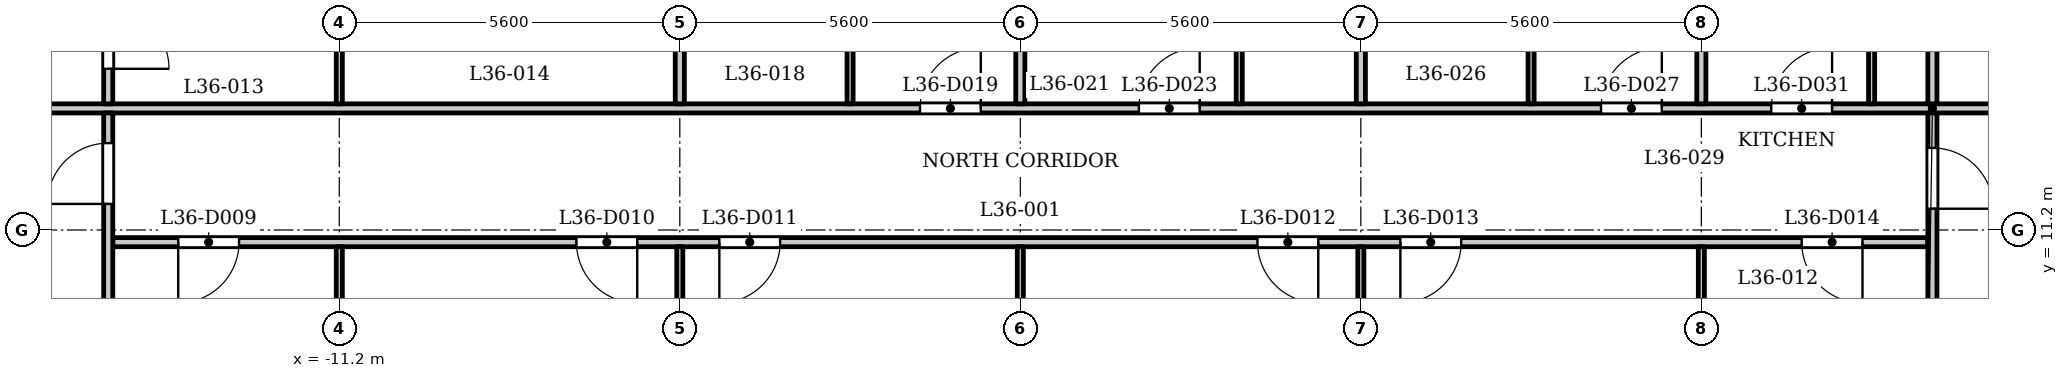
"""IFC4 building model, lengths in metres.
Left out: names, types, materials, properties, quantities, classifications, styles, units other than length and angle.
Written with IfcOpenShell. Run it as: python <this file> out.ifc"""

import sys

from ifc_helpers import new_model, si_unit, direction, frame, frame_2d, origin, place, context, subcontext, project, spatial, rectangle, extrude, element, fill, save


model = new_model("IFC4")
c1 = context("Model", 3, precision=1e-05, world=origin(), true_north=direction((0.0, 1.0)))
c2 = subcontext(c1, "Body", "Model", "MODEL_VIEW")
j1 = project(units=[si_unit("LENGTHUNIT", "METRE"), si_unit("PLANEANGLEUNIT", "RADIAN")], contexts=[c1])
p1 = place(None, origin())
s1 = spatial("IfcSite", under=j1, at=p1, CompositionType="ELEMENT")
p2 = place(p1, origin())
s2 = spatial("IfcBuilding", under=s1, at=p2, CompositionType="ELEMENT")
p3 = place(p2, frame((0.0, 0.0, 143.1)))
s3 = spatial("IfcBuildingStorey", under=s2, at=p3, CompositionType="ELEMENT", Elevation=143.1)
p4 = place(p3, frame((-14.925, 11.0, 0.0), z_axis=(0.0, 0.0, 1.0), x_axis=(1.0, 0.0, 0.0)))
e1 = element("IfcWall", 1, at=p4, inside=s3, PredefinedType="PARTITIONING", context=c2, shape_type="SweptSolid", body=[
    extrude(rectangle(XDim=29.85, YDim=0.15, at=frame_2d((14.925, 0.0))), origin(), (0.0, 0.0, 1.0), 3.2),
])
p5 = place(p4, frame((1.076, 0.0, 0.0)))
e2 = element("IfcOpeningElement", 2, at=p5, cuts=e1, PredefinedType="OPENING", context=c2, shape_type="SweptSolid", body=[
    extrude(rectangle(XDim=1.0, YDim=2.1, at=frame_2d((0.5, 1.05))), frame((0.0, 0.085, 0.0), z_axis=(0.0, -1.0, 0.0), x_axis=(1.0, 0.0, 0.0)), (0.0, 0.0, 1.0), 0.17),
])
p6 = place(p4, frame((7.625, 0.0, 0.0)))
e3 = element("IfcOpeningElement", 3, at=p6, cuts=e1, PredefinedType="OPENING", context=c2, shape_type="SweptSolid", body=[
    extrude(rectangle(XDim=1.0, YDim=2.1, at=frame_2d((0.5, 1.05))), frame((0.0, 0.085, 0.0), z_axis=(0.0, -1.0, 0.0), x_axis=(1.0, 0.0, 0.0)), (0.0, 0.0, 1.0), 0.17),
])
p7 = place(p4, frame((9.975, 0.0, 0.0)))
e4 = element("IfcOpeningElement", 4, at=p7, cuts=e1, PredefinedType="OPENING", context=c2, shape_type="SweptSolid", body=[
    extrude(rectangle(XDim=1.0, YDim=2.1, at=frame_2d((0.5, 1.05))), frame((0.0, 0.085, 0.0), z_axis=(0.0, -1.0, 0.0), x_axis=(1.0, 0.0, 0.0)), (0.0, 0.0, 1.0), 0.17),
])
p8 = place(p4, frame((18.825, 0.0, 0.0)))
e5 = element("IfcOpeningElement", 5, at=p8, cuts=e1, PredefinedType="OPENING", context=c2, shape_type="SweptSolid", body=[
    extrude(rectangle(XDim=1.0, YDim=2.1, at=frame_2d((0.5, 1.05))), frame((0.0, 0.085, 0.0), z_axis=(0.0, -1.0, 0.0), x_axis=(1.0, 0.0, 0.0)), (0.0, 0.0, 1.0), 0.17),
])
p9 = place(p4, frame((21.175, 0.0, 0.0)))
e6 = element("IfcOpeningElement", 6, at=p9, cuts=e1, PredefinedType="OPENING", context=c2, shape_type="SweptSolid", body=[
    extrude(rectangle(XDim=1.0, YDim=2.1, at=frame_2d((0.5, 1.05))), frame((0.0, 0.085, 0.0), z_axis=(0.0, -1.0, 0.0), x_axis=(1.0, 0.0, 0.0)), (0.0, 0.0, 1.0), 0.17),
])
p10 = place(p4, frame((27.775, 0.0, 0.0)))
e7 = element("IfcOpeningElement", 7, at=p10, cuts=e1, PredefinedType="OPENING", context=c2, shape_type="SweptSolid", body=[
    extrude(rectangle(XDim=1.0, YDim=2.1, at=frame_2d((0.5, 1.05))), frame((0.0, 0.085, 0.0), z_axis=(0.0, -1.0, 0.0), x_axis=(1.0, 0.0, 0.0)), (0.0, 0.0, 1.0), 0.17),
])
p11 = place(p3, frame((-17.4, 13.2, 0.0), z_axis=(0.0, 0.0, 1.0), x_axis=(1.0, 0.0, 0.0)))
e8 = element("IfcWall", 8, at=p11, inside=s3, PredefinedType="PARTITIONING", context=c2, shape_type="SweptSolid", body=[
    extrude(rectangle(XDim=34.8, YDim=0.15, at=frame_2d((17.4, 0.0))), origin(), (0.0, 0.0, 1.0), 3.2),
])
p12 = place(p11, frame((0.25, 0.0, 0.0)))
e9 = element("IfcOpeningElement", 9, at=p12, cuts=e8, PredefinedType="OPENING", context=c2, shape_type="SweptSolid", body=[
    extrude(rectangle(XDim=1.0, YDim=2.1, at=frame_2d((0.5, 1.05))), frame((0.0, 0.085, 0.0), z_axis=(0.0, -1.0, 0.0), x_axis=(1.0, 0.0, 0.0)), (0.0, 0.0, 1.0), 0.17),
])
p13 = place(p11, frame((33.65, 0.0, 0.0)))
e10 = element("IfcOpeningElement", 10, at=p13, cuts=e8, PredefinedType="OPENING", context=c2, shape_type="SweptSolid", body=[
    extrude(rectangle(XDim=1.0, YDim=2.1, at=frame_2d((0.5, 1.05))), frame((0.0, 0.085, 0.0), z_axis=(0.0, -1.0, 0.0), x_axis=(1.0, 0.0, 0.0)), (0.0, 0.0, 1.0), 0.17),
])
p14 = place(p11, frame((15.75, 0.0, 0.0)))
e11 = element("IfcOpeningElement", 11, at=p14, cuts=e8, PredefinedType="OPENING", context=c2, shape_type="SweptSolid", body=[
    extrude(rectangle(XDim=1.0, YDim=2.1, at=frame_2d((0.5, 1.05))), frame((0.0, 0.085, 0.0), z_axis=(0.0, -1.0, 0.0), x_axis=(1.0, 0.0, 0.0)), (0.0, 0.0, 1.0), 0.17),
])
p15 = place(p11, frame((19.35, 0.0, 0.0)))
e12 = element("IfcOpeningElement", 12, at=p15, cuts=e8, PredefinedType="OPENING", context=c2, shape_type="SweptSolid", body=[
    extrude(rectangle(XDim=1.0, YDim=2.1, at=frame_2d((0.5, 1.05))), frame((0.0, 0.085, 0.0), z_axis=(0.0, -1.0, 0.0), x_axis=(1.0, 0.0, 0.0)), (0.0, 0.0, 1.0), 0.17),
])
p16 = place(p11, frame((26.95, 0.0, 0.0)))
e13 = element("IfcOpeningElement", 13, at=p16, cuts=e8, PredefinedType="OPENING", context=c2, shape_type="SweptSolid", body=[
    extrude(rectangle(XDim=1.0, YDim=2.1, at=frame_2d((0.5, 1.05))), frame((0.0, 0.085, 0.0), z_axis=(0.0, -1.0, 0.0), x_axis=(1.0, 0.0, 0.0)), (0.0, 0.0, 1.0), 0.17),
])
p17 = place(p11, frame((29.75, 0.0, 0.0)))
e14 = element("IfcOpeningElement", 14, at=p17, cuts=e8, PredefinedType="OPENING", context=c2, shape_type="SweptSolid", body=[
    extrude(rectangle(XDim=1.0, YDim=2.1, at=frame_2d((0.5, 1.05))), frame((0.0, 0.085, 0.0), z_axis=(0.0, -1.0, 0.0), x_axis=(1.0, 0.0, 0.0)), (0.0, 0.0, 1.0), 0.17),
])
p18 = place(p3, frame((-15.0, 6.769, 0.0), z_axis=(0.0, 0.0, 1.0), x_axis=(0.0, 1.0, 0.0)))
e15 = element("IfcWall", 15, at=p18, inside=s3, PredefinedType="PARTITIONING", context=c2, shape_type="SweptSolid", body=[
    extrude(rectangle(XDim=6.356, YDim=0.15, at=frame_2d((3.178, 0.0))), origin(), (0.0, 0.0, 1.0), 3.2),
])
p19 = place(p18, frame((4.86, 0.0, 0.0)))
e16 = element("IfcOpeningElement", 16, at=p19, cuts=e15, PredefinedType="OPENING", context=c2, shape_type="SweptSolid", body=[
    extrude(rectangle(XDim=1.0, YDim=2.1, at=frame_2d((0.5, 1.05))), frame((0.0, 0.085, 0.0), z_axis=(0.0, -1.0, 0.0), x_axis=(1.0, 0.0, 0.0)), (0.0, 0.0, 1.0), 0.17),
])
p20 = place(p3, frame((-15.0, 13.275, 0.0), z_axis=(0.0, 0.0, 1.0), x_axis=(0.0, 1.0, 0.0)))
e17 = element("IfcWall", 17, at=p20, inside=s3, PredefinedType="PARTITIONING", context=c2, shape_type="SweptSolid", body=[
    extrude(rectangle(XDim=2.05, YDim=0.15, at=frame_2d((1.025, 0.0))), origin(), (0.0, 0.0, 1.0), 3.2),
])
p21 = place(p20, frame((0.576, 0.0, 0.0)))
e18 = element("IfcOpeningElement", 18, at=p21, cuts=e17, PredefinedType="OPENING", context=c2, shape_type="SweptSolid", body=[
    extrude(rectangle(XDim=1.0, YDim=2.1, at=frame_2d((0.5, 1.05))), frame((0.0, 0.085, 0.0), z_axis=(0.0, -1.0, 0.0), x_axis=(1.0, 0.0, 0.0)), (0.0, 0.0, 1.0), 0.17),
])
p22 = place(p3, frame((-11.2, 7.32, 0.0), z_axis=(0.0, 0.0, 1.0), x_axis=(0.0, 1.0, 0.0)))
e19 = element("IfcWall", 19, at=p22, inside=s3, PredefinedType="PARTITIONING", context=c2, shape_type="SweptSolid", body=[
    extrude(rectangle(XDim=3.605, YDim=0.1, at=frame_2d((1.802, 0.0))), origin(), (0.0, 0.0, 1.0), 3.2),
])
p23 = place(p3, frame((-11.2, 13.275, 0.0), z_axis=(0.0, 0.0, 1.0), x_axis=(0.0, 1.0, 0.0)))
e20 = element("IfcWall", 20, at=p23, inside=s3, PredefinedType="PARTITIONING", context=c2, shape_type="SweptSolid", body=[
    extrude(rectangle(XDim=3.175, YDim=0.1, at=frame_2d((1.587, 0.0))), origin(), (0.0, 0.0, 1.0), 3.2),
])
p24 = place(p3, frame((-5.6, 7.32, 0.0), z_axis=(0.0, 0.0, 1.0), x_axis=(0.0, 1.0, 0.0)))
e21 = element("IfcWall", 21, at=p24, inside=s3, PredefinedType="PARTITIONING", context=c2, shape_type="SweptSolid", body=[
    extrude(rectangle(XDim=3.605, YDim=0.1, at=frame_2d((1.802, 0.0))), origin(), (0.0, 0.0, 1.0), 3.2),
])
p25 = place(p3, frame((-5.6, 13.275, 0.0), z_axis=(0.0, 0.0, 1.0), x_axis=(0.0, 1.0, 0.0)))
e22 = element("IfcWall", 22, at=p25, inside=s3, PredefinedType="PARTITIONING", context=c2, shape_type="SweptSolid", body=[
    extrude(rectangle(XDim=3.175, YDim=0.15, at=frame_2d((1.587, 0.0))), origin(), (0.0, 0.0, 1.0), 3.2),
])
p26 = place(p3, frame((-2.8, 13.275, 0.0), z_axis=(0.0, 0.0, 1.0), x_axis=(0.0, 1.0, 0.0)))
e23 = element("IfcWall", 23, at=p26, inside=s3, PredefinedType="PARTITIONING", context=c2, shape_type="SweptSolid", body=[
    extrude(rectangle(XDim=3.175, YDim=0.1, at=frame_2d((1.587, 0.0))), origin(), (0.0, 0.0, 1.0), 3.2),
])
p27 = place(p3, frame((0.0, 7.32, 0.0), z_axis=(0.0, 0.0, 1.0), x_axis=(0.0, 1.0, 0.0)))
e24 = element("IfcWall", 24, at=p27, inside=s3, PredefinedType="PARTITIONING", context=c2, shape_type="SweptSolid", body=[
    extrude(rectangle(XDim=3.605, YDim=0.1, at=frame_2d((1.802, 0.0))), origin(), (0.0, 0.0, 1.0), 3.2),
])
p28 = place(p3, frame((0.0, 13.275, 0.0), z_axis=(0.0, 0.0, 1.0), x_axis=(0.0, 1.0, 0.0)))
e25 = element("IfcWall", 25, at=p28, inside=s3, PredefinedType="PARTITIONING", context=c2, shape_type="SweptSolid", body=[
    extrude(rectangle(XDim=3.175, YDim=0.15, at=frame_2d((1.587, 0.0))), origin(), (0.0, 0.0, 1.0), 3.2),
])
p29 = place(p3, frame((3.6, 13.275, 0.0), z_axis=(0.0, 0.0, 1.0), x_axis=(0.0, 1.0, 0.0)))
e26 = element("IfcWall", 26, at=p29, inside=s3, PredefinedType="PARTITIONING", context=c2, shape_type="SweptSolid", body=[
    extrude(rectangle(XDim=3.175, YDim=0.1, at=frame_2d((1.587, 0.0))), origin(), (0.0, 0.0, 1.0), 3.2),
])
p30 = place(p3, frame((5.6, 7.32, 0.0), z_axis=(0.0, 0.0, 1.0), x_axis=(0.0, 1.0, 0.0)))
e27 = element("IfcWall", 27, at=p30, inside=s3, PredefinedType="PARTITIONING", context=c2, shape_type="SweptSolid", body=[
    extrude(rectangle(XDim=3.605, YDim=0.1, at=frame_2d((1.802, 0.0))), origin(), (0.0, 0.0, 1.0), 3.2),
])
p31 = place(p3, frame((5.6, 13.275, 0.0), z_axis=(0.0, 0.0, 1.0), x_axis=(0.0, 1.0, 0.0)))
e28 = element("IfcWall", 28, at=p31, inside=s3, PredefinedType="PARTITIONING", context=c2, shape_type="SweptSolid", body=[
    extrude(rectangle(XDim=3.175, YDim=0.15, at=frame_2d((1.587, 0.0))), origin(), (0.0, 0.0, 1.0), 3.2),
])
p32 = place(p3, frame((8.4, 13.275, 0.0), z_axis=(0.0, 0.0, 1.0), x_axis=(0.0, 1.0, 0.0)))
e29 = element("IfcWall", 29, at=p32, inside=s3, PredefinedType="PARTITIONING", context=c2, shape_type="SweptSolid", body=[
    extrude(rectangle(XDim=3.175, YDim=0.1, at=frame_2d((1.587, 0.0))), origin(), (0.0, 0.0, 1.0), 3.2),
])
p33 = place(p3, frame((11.2, 7.32, 0.0), z_axis=(0.0, 0.0, 1.0), x_axis=(0.0, 1.0, 0.0)))
e30 = element("IfcWall", 30, at=p33, inside=s3, PredefinedType="PARTITIONING", context=c2, shape_type="SweptSolid", body=[
    extrude(rectangle(XDim=3.605, YDim=0.1, at=frame_2d((1.802, 0.0))), origin(), (0.0, 0.0, 1.0), 3.2),
])
p34 = place(p3, frame((11.2, 13.275, 0.0), z_axis=(0.0, 0.0, 1.0), x_axis=(0.0, 1.0, 0.0)))
e31 = element("IfcWall", 31, at=p34, inside=s3, PredefinedType="PARTITIONING", context=c2, shape_type="SweptSolid", body=[
    extrude(rectangle(XDim=3.175, YDim=0.15, at=frame_2d((1.587, 0.0))), origin(), (0.0, 0.0, 1.0), 3.2),
])
p35 = place(p3, frame((14.0, 13.275, 0.0), z_axis=(0.0, 0.0, 1.0), x_axis=(0.0, 1.0, 0.0)))
e32 = element("IfcWall", 32, at=p35, inside=s3, PredefinedType="PARTITIONING", context=c2, shape_type="SweptSolid", body=[
    extrude(rectangle(XDim=3.175, YDim=0.1, at=frame_2d((1.587, 0.0))), origin(), (0.0, 0.0, 1.0), 3.2),
])
p36 = place(p3, frame((15.0, 6.769, 0.0), z_axis=(0.0, 0.0, 1.0), x_axis=(0.0, 1.0, 0.0)))
e33 = element("IfcWall", 33, at=p36, inside=s3, PredefinedType="PARTITIONING", context=c2, shape_type="SweptSolid", body=[
    extrude(rectangle(XDim=6.356, YDim=0.15, at=frame_2d((3.178, 0.0))), origin(), (0.0, 0.0, 1.0), 3.2),
])
p37 = place(p36, frame((4.781, 0.0, 0.0)))
e34 = element("IfcOpeningElement", 34, at=p37, cuts=e33, PredefinedType="OPENING", context=c2, shape_type="SweptSolid", body=[
    extrude(rectangle(XDim=1.0, YDim=2.1, at=frame_2d((0.5, 1.05))), frame((0.0, 0.085, 0.0), z_axis=(0.0, -1.0, 0.0), x_axis=(1.0, 0.0, 0.0)), (0.0, 0.0, 1.0), 0.17),
])
p38 = place(p3, frame((15.0, 13.275, 0.0), z_axis=(0.0, 0.0, 1.0), x_axis=(0.0, 1.0, 0.0)))
e35 = element("IfcWall", 35, at=p38, inside=s3, PredefinedType="PARTITIONING", context=c2, shape_type="SweptSolid", body=[
    extrude(rectangle(XDim=2.05, YDim=0.15, at=frame_2d((1.025, 0.0))), origin(), (0.0, 0.0, 1.0), 3.2),
])
p39 = place(p19, origin())
e36 = element("IfcDoor", 36, at=p39, inside=s3, OperationType="SINGLE_SWING_RIGHT", PredefinedType="DOOR", context=c2, shape_type="SweptSolid", body=[
    extrude(rectangle(XDim=1.0, YDim=2.1, at=frame_2d((0.5, 1.05))), frame((0.0, 0.025, 0.0), z_axis=(0.0, -1.0, 0.0), x_axis=(1.0, 0.0, 0.0)), (0.0, 0.0, 1.0), 0.05),
])
fill(e16, e36)
p40 = place(p37, origin())
e37 = element("IfcDoor", 37, at=p40, inside=s3, OperationType="SINGLE_SWING_LEFT", PredefinedType="DOOR", context=c2, shape_type="SweptSolid", body=[
    extrude(rectangle(XDim=1.0, YDim=2.1, at=frame_2d((0.5, 1.05))), frame((0.0, 0.025, 0.0), z_axis=(0.0, -1.0, 0.0), x_axis=(1.0, 0.0, 0.0)), (0.0, 0.0, 1.0), 0.05),
])
fill(e34, e37)
p41 = place(p5, origin())
e38 = element("IfcDoor", 38, at=p41, inside=s3, OperationType="SINGLE_SWING_LEFT", PredefinedType="DOOR", context=c2, shape_type="SweptSolid", body=[
    extrude(rectangle(XDim=1.0, YDim=2.1, at=frame_2d((0.5, 1.05))), frame((0.0, 0.025, 0.0), z_axis=(0.0, -1.0, 0.0), x_axis=(1.0, 0.0, 0.0)), (0.0, 0.0, 1.0), 0.05),
])
fill(e2, e38)
p42 = place(p6, origin())
e39 = element("IfcDoor", 39, at=p42, inside=s3, OperationType="SINGLE_SWING_RIGHT", PredefinedType="DOOR", context=c2, shape_type="SweptSolid", body=[
    extrude(rectangle(XDim=1.0, YDim=2.1, at=frame_2d((0.5, 1.05))), frame((0.0, 0.025, 0.0), z_axis=(0.0, -1.0, 0.0), x_axis=(1.0, 0.0, 0.0)), (0.0, 0.0, 1.0), 0.05),
])
fill(e3, e39)
p43 = place(p7, origin())
e40 = element("IfcDoor", 40, at=p43, inside=s3, OperationType="SINGLE_SWING_LEFT", PredefinedType="DOOR", context=c2, shape_type="SweptSolid", body=[
    extrude(rectangle(XDim=1.0, YDim=2.1, at=frame_2d((0.5, 1.05))), frame((0.0, 0.025, 0.0), z_axis=(0.0, -1.0, 0.0), x_axis=(1.0, 0.0, 0.0)), (0.0, 0.0, 1.0), 0.05),
])
fill(e4, e40)
p44 = place(p8, origin())
e41 = element("IfcDoor", 41, at=p44, inside=s3, OperationType="SINGLE_SWING_RIGHT", PredefinedType="DOOR", context=c2, shape_type="SweptSolid", body=[
    extrude(rectangle(XDim=1.0, YDim=2.1, at=frame_2d((0.5, 1.05))), frame((0.0, 0.025, 0.0), z_axis=(0.0, -1.0, 0.0), x_axis=(1.0, 0.0, 0.0)), (0.0, 0.0, 1.0), 0.05),
])
fill(e5, e41)
p45 = place(p9, origin())
e42 = element("IfcDoor", 42, at=p45, inside=s3, OperationType="SINGLE_SWING_LEFT", PredefinedType="DOOR", context=c2, shape_type="SweptSolid", body=[
    extrude(rectangle(XDim=1.0, YDim=2.1, at=frame_2d((0.5, 1.05))), frame((0.0, 0.025, 0.0), z_axis=(0.0, -1.0, 0.0), x_axis=(1.0, 0.0, 0.0)), (0.0, 0.0, 1.0), 0.05),
])
fill(e6, e42)
p46 = place(p10, origin())
e43 = element("IfcDoor", 43, at=p46, inside=s3, OperationType="SINGLE_SWING_RIGHT", PredefinedType="DOOR", context=c2, shape_type="SweptSolid", body=[
    extrude(rectangle(XDim=1.0, YDim=2.1, at=frame_2d((0.5, 1.05))), frame((0.0, 0.025, 0.0), z_axis=(0.0, -1.0, 0.0), x_axis=(1.0, 0.0, 0.0)), (0.0, 0.0, 1.0), 0.05),
])
fill(e7, e43)
p47 = place(p21, origin())
e44 = element("IfcDoor", 44, at=p47, inside=s3, OperationType="SINGLE_SWING_LEFT", PredefinedType="DOOR", context=c2, shape_type="SweptSolid", body=[
    extrude(rectangle(XDim=1.0, YDim=2.1, at=frame_2d((0.5, 1.05))), frame((0.0, 0.025, 0.0), z_axis=(0.0, -1.0, 0.0), x_axis=(1.0, 0.0, 0.0)), (0.0, 0.0, 1.0), 0.05),
])
fill(e18, e44)
p48 = place(p14, origin())
e45 = element("IfcDoor", 45, at=p48, inside=s3, OperationType="SINGLE_SWING_LEFT", PredefinedType="DOOR", context=c2, shape_type="SweptSolid", body=[
    extrude(rectangle(XDim=1.0, YDim=2.1, at=frame_2d((0.5, 1.05))), frame((0.0, 0.025, 0.0), z_axis=(0.0, -1.0, 0.0), x_axis=(1.0, 0.0, 0.0)), (0.0, 0.0, 1.0), 0.05),
])
fill(e11, e45)
p49 = place(p15, origin())
e46 = element("IfcDoor", 46, at=p49, inside=s3, OperationType="SINGLE_SWING_LEFT", PredefinedType="DOOR", context=c2, shape_type="SweptSolid", body=[
    extrude(rectangle(XDim=1.0, YDim=2.1, at=frame_2d((0.5, 1.05))), frame((0.0, 0.025, 0.0), z_axis=(0.0, -1.0, 0.0), x_axis=(1.0, 0.0, 0.0)), (0.0, 0.0, 1.0), 0.05),
])
fill(e12, e46)
p50 = place(p16, origin())
e47 = element("IfcDoor", 47, at=p50, inside=s3, OperationType="SINGLE_SWING_LEFT", PredefinedType="DOOR", context=c2, shape_type="SweptSolid", body=[
    extrude(rectangle(XDim=1.0, YDim=2.1, at=frame_2d((0.5, 1.05))), frame((0.0, 0.025, 0.0), z_axis=(0.0, -1.0, 0.0), x_axis=(1.0, 0.0, 0.0)), (0.0, 0.0, 1.0), 0.05),
])
fill(e13, e47)
p51 = place(p17, origin())
e48 = element("IfcDoor", 48, at=p51, inside=s3, OperationType="SINGLE_SWING_LEFT", PredefinedType="DOOR", context=c2, shape_type="SweptSolid", body=[
    extrude(rectangle(XDim=1.0, YDim=2.1, at=frame_2d((0.5, 1.05))), frame((0.0, 0.025, 0.0), z_axis=(0.0, -1.0, 0.0), x_axis=(1.0, 0.0, 0.0)), (0.0, 0.0, 1.0), 0.05),
])
fill(e14, e48)
save(model, sys.argv[1])
